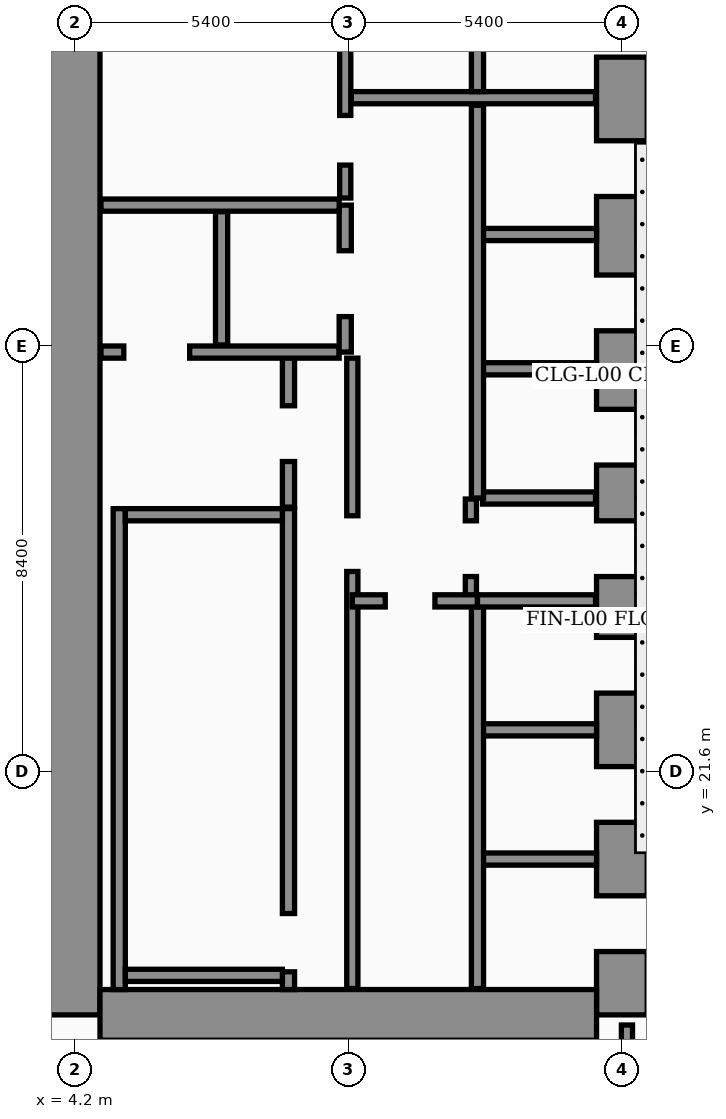
"""IFC4 building model, lengths in metres.
Left out: names, types, materials, properties, quantities, classifications, styles, units other than length and angle.
Written with IfcOpenShell. Run it as: python <this file> out.ifc"""

import sys

from ifc_helpers import new_model, si_unit, direction, frame, frame_2d, origin, place, context, subcontext, project, spatial, rectangle, extrude, element, fill, save


model = new_model("IFC4")
c1 = context("Model", 3, precision=1e-05, world=origin(), true_north=direction((0.0, 1.0)))
c2 = subcontext(c1, "Body", "Model", "MODEL_VIEW")
j1 = project(units=[si_unit("LENGTHUNIT", "METRE"), si_unit("PLANEANGLEUNIT", "RADIAN")], contexts=[c1])
p1 = place(None, origin())
s1 = spatial("IfcSite", under=j1, at=p1, CompositionType="ELEMENT")
p2 = place(p1, origin())
s2 = spatial("IfcBuilding", under=s1, at=p2, CompositionType="ELEMENT")
p3 = place(p2, origin())
s3 = spatial("IfcBuildingStorey", under=s2, at=p3, CompositionType="ELEMENT", Elevation=0.0)
p4 = place(p3, frame((4.2, 16.8, 0.0), z_axis=(0.0, 0.0, 1.0), x_axis=(0.0, 1.0, 0.0)))
e1 = element("IfcWall", 1, at=p4, inside=s3, PredefinedType="SHEAR", context=c2, shape_type="SweptSolid", body=[
    extrude(rectangle(XDim=21.6, YDim=1.0, at=frame_2d((10.8, 0.0))), origin(), (0.0, 0.0, 1.0), 5.68),
])
p5 = place(p3, frame((15.0, 16.8, 0.0), z_axis=(0.0, 0.0, 1.0), x_axis=(0.0, 1.0, 0.0)))
e2 = element("IfcWall", 2, at=p5, inside=s3, PredefinedType="SHEAR", context=c2, shape_type="SweptSolid", body=[
    extrude(rectangle(XDim=21.6, YDim=1.0, at=frame_2d((10.8, 0.0))), origin(), (0.0, 0.0, 1.0), 5.68),
])
p6 = place(p5, frame((8.65, 0.0, 0.0)))
e3 = element("IfcOpeningElement", 3, at=p6, cuts=e2, PredefinedType="OPENING", context=c2, shape_type="SweptSolid", body=[
    extrude(rectangle(XDim=1.1, YDim=2.2, at=frame_2d((0.55, 1.1))), frame((0.0, 0.51, 0.0), z_axis=(0.0, -1.0, 0.0), x_axis=(1.0, 0.0, 0.0)), (0.0, 0.0, 1.0), 1.02),
])
p7 = place(p5, frame((1.25, 0.0, 0.0)))
e4 = element("IfcOpeningElement", 4, at=p7, cuts=e2, PredefinedType="OPENING", context=c2, shape_type="SweptSolid", body=[
    extrude(rectangle(XDim=1.1, YDim=2.2, at=frame_2d((0.55, 1.1))), frame((0.0, 0.51, 0.0), z_axis=(0.0, -1.0, 0.0), x_axis=(1.0, 0.0, 0.0)), (0.0, 0.0, 1.0), 1.02),
])
p8 = place(p5, frame((3.8, 0.0, 0.0)))
e5 = element("IfcOpeningElement", 5, at=p8, cuts=e2, PredefinedType="OPENING", context=c2, shape_type="SweptSolid", body=[
    extrude(rectangle(XDim=1.1, YDim=2.2, at=frame_2d((0.55, 1.1))), frame((0.0, 0.51, 0.0), z_axis=(0.0, -1.0, 0.0), x_axis=(1.0, 0.0, 0.0)), (0.0, 0.0, 1.0), 1.02),
])
p9 = place(p5, frame((6.35, 0.0, 0.0)))
e6 = element("IfcOpeningElement", 6, at=p9, cuts=e2, PredefinedType="OPENING", context=c2, shape_type="SweptSolid", body=[
    extrude(rectangle(XDim=1.1, YDim=2.2, at=frame_2d((0.55, 1.1))), frame((0.0, 0.51, 0.0), z_axis=(0.0, -1.0, 0.0), x_axis=(1.0, 0.0, 0.0)), (0.0, 0.0, 1.0), 1.02),
])
p10 = place(p5, frame((10.85, 0.0, 0.0)))
e7 = element("IfcOpeningElement", 7, at=p10, cuts=e2, PredefinedType="OPENING", context=c2, shape_type="SweptSolid", body=[
    extrude(rectangle(XDim=1.1, YDim=2.2, at=frame_2d((0.55, 1.1))), frame((0.0, 0.51, 0.0), z_axis=(0.0, -1.0, 0.0), x_axis=(1.0, 0.0, 0.0)), (0.0, 0.0, 1.0), 1.02),
])
p11 = place(p5, frame((13.5, 0.0, 0.0)))
e8 = element("IfcOpeningElement", 8, at=p11, cuts=e2, PredefinedType="OPENING", context=c2, shape_type="SweptSolid", body=[
    extrude(rectangle(XDim=1.1, YDim=2.2, at=frame_2d((0.55, 1.1))), frame((0.0, 0.51, 0.0), z_axis=(0.0, -1.0, 0.0), x_axis=(1.0, 0.0, 0.0)), (0.0, 0.0, 1.0), 1.02),
])
p12 = place(p5, frame((16.15, 0.0, 0.0)))
e9 = element("IfcOpeningElement", 9, at=p12, cuts=e2, PredefinedType="OPENING", context=c2, shape_type="SweptSolid", body=[
    extrude(rectangle(XDim=1.1, YDim=2.2, at=frame_2d((0.55, 1.1))), frame((0.0, 0.51, 0.0), z_axis=(0.0, -1.0, 0.0), x_axis=(1.0, 0.0, 0.0)), (0.0, 0.0, 1.0), 1.02),
])
p13 = place(p5, frame((18.9, 0.0, 0.0)))
e10 = element("IfcOpeningElement", 10, at=p13, cuts=e2, PredefinedType="OPENING", context=c2, shape_type="SweptSolid", body=[
    extrude(rectangle(XDim=1.1, YDim=2.2, at=frame_2d((0.55, 1.1))), frame((0.0, 0.51, 0.0), z_axis=(0.0, -1.0, 0.0), x_axis=(1.0, 0.0, 0.0)), (0.0, 0.0, 1.0), 1.02),
])
p14 = place(p3, frame((4.7, 16.8, 0.0), z_axis=(0.0, 0.0, 1.0), x_axis=(1.0, 0.0, 0.0)))
e11 = element("IfcWall", 11, at=p14, inside=s3, PredefinedType="SHEAR", context=c2, shape_type="SweptSolid", body=[
    extrude(rectangle(XDim=9.8, YDim=1.0, at=frame_2d((4.9, 0.0))), origin(), (0.0, 0.0, 1.0), 5.68),
])
p15 = place(p3, frame((5.08, 17.3, 0.0), z_axis=(0.0, 0.0, 1.0), x_axis=(0.0, 1.0, 0.0)))
e12 = element("IfcWall", 12, at=p15, inside=s3, PredefinedType="SOLIDWALL", context=c2, shape_type="SweptSolid", body=[
    extrude(rectangle(XDim=9.49, YDim=0.24, at=frame_2d((4.745, 0.0))), origin(), (0.0, 0.0, 1.0), 5.68),
])
p16 = place(p3, frame((8.42, 17.3, 0.0), z_axis=(0.0, 0.0, 1.0), x_axis=(0.0, 1.0, 0.0)))
e13 = element("IfcWall", 13, at=p16, inside=s3, PredefinedType="SOLIDWALL", context=c2, shape_type="SweptSolid", body=[
    extrude(rectangle(XDim=9.49, YDim=0.24, at=frame_2d((4.745, 0.0))), origin(), (0.0, 0.0, 1.0), 5.68),
])
p17 = place(p16, frame((0.35, 0.0, 0.0)))
e14 = element("IfcOpeningElement", 14, at=p17, cuts=e13, PredefinedType="OPENING", context=c2, shape_type="SweptSolid", body=[
    extrude(rectangle(XDim=1.15, YDim=2.2, at=frame_2d((0.575, 1.1))), frame((0.0, 0.13, 0.0), z_axis=(0.0, -1.0, 0.0), x_axis=(1.0, 0.0, 0.0)), (0.0, 0.0, 1.0), 0.26),
])
for number, where, z_axis, x_axis in (
    (15, (5.2, 17.58, 0.0), (0.0, 0.0, 1.0), (1.0, 0.0, 0.0)),
    (16, (5.2, 26.67, 0.0), (0.0, 0.0, 1.0), (1.0, 0.0, 0.0)),
):
    element("IfcWall", number, at=place(p3, frame(where, z_axis=z_axis, x_axis=x_axis)), inside=s3, PredefinedType="SOLIDWALL", context=c2, shape_type="SweptSolid", body=[
        extrude(rectangle(XDim=3.1, YDim=0.24, at=frame_2d((1.55, 0.0))), origin(), (0.0, 0.0, 1.0), 5.68),
    ])
for number, where, z_axis, x_axis in (
    (17, (12.18, 19.875, 0.0), (0.0, 0.0, 1.0), (1.0, 0.0, 0.0)),
    (18, (12.18, 22.425, 0.0), (0.0, 0.0, 1.0), (1.0, 0.0, 0.0)),
    (19, (12.18, 29.55, 0.0), (0.0, 0.0, 1.0), (1.0, 0.0, 0.0)),
    (20, (12.18, 32.2, 0.0), (0.0, 0.0, 1.0), (1.0, 0.0, 0.0)),
):
    element("IfcWall", number, at=place(p3, frame(where, z_axis=z_axis, x_axis=x_axis)), inside=s3, PredefinedType="SOLIDWALL", context=c2, shape_type="SweptSolid", body=[
        extrude(rectangle(XDim=2.32, YDim=0.24, at=frame_2d((1.16, 0.0))), origin(), (0.0, 0.0, 1.0), 5.68),
    ])
p18 = place(p3, frame((8.42, 26.82, 0.0), z_axis=(0.0, 0.0, 1.0), x_axis=(0.0, 1.0, 0.0)))
e21 = element("IfcWall", 21, at=p18, inside=s3, PredefinedType="SOLIDWALL", context=c2, shape_type="SweptSolid", body=[
    extrude(rectangle(XDim=3.0, YDim=0.24, at=frame_2d((1.5, 0.0))), origin(), (0.0, 0.0, 1.0), 5.68),
])
p19 = place(p18, frame((0.9, 0.0, 0.0)))
e22 = element("IfcOpeningElement", 22, at=p19, cuts=e21, PredefinedType="OPENING", context=c2, shape_type="SweptSolid", body=[
    extrude(rectangle(XDim=1.1, YDim=2.2, at=frame_2d((0.55, 1.1))), frame((0.0, 0.13, 0.0), z_axis=(0.0, -1.0, 0.0), x_axis=(1.0, 0.0, 0.0)), (0.0, 0.0, 1.0), 0.26),
])
p20 = place(p3, frame((4.72, 29.88, 0.0), z_axis=(0.0, 0.0, 1.0), x_axis=(1.0, 0.0, 0.0)))
e23 = element("IfcWall", 23, at=p20, inside=s3, PredefinedType="SOLIDWALL", context=c2, shape_type="SweptSolid", body=[
    extrude(rectangle(XDim=4.7, YDim=0.24, at=frame_2d((2.35, 0.0))), origin(), (0.0, 0.0, 1.0), 5.68),
])
p21 = place(p20, frame((0.45, 0.0, 0.0)))
e24 = element("IfcOpeningElement", 24, at=p21, cuts=e23, PredefinedType="OPENING", context=c2, shape_type="SweptSolid", body=[
    extrude(rectangle(XDim=1.3, YDim=2.35, at=frame_2d((0.65, 1.175))), frame((0.0, 0.13, 0.0), z_axis=(0.0, -1.0, 0.0), x_axis=(1.0, 0.0, 0.0)), (0.0, 0.0, 1.0), 0.26),
])
p22 = place(p3, frame((7.1, 30.02, 0.0), z_axis=(0.0, 0.0, 1.0), x_axis=(0.0, 1.0, 0.0)))
e25 = element("IfcWall", 25, at=p22, inside=s3, PredefinedType="SOLIDWALL", context=c2, shape_type="SweptSolid", body=[
    extrude(rectangle(XDim=2.63, YDim=0.24, at=frame_2d((1.315, 0.0))), origin(), (0.0, 0.0, 1.0), 5.68),
])
p23 = place(p3, frame((9.54, 29.88, 0.0), z_axis=(0.0, 0.0, 1.0), x_axis=(0.0, 1.0, 0.0)))
e26 = element("IfcWall", 26, at=p23, inside=s3, PredefinedType="SOLIDWALL", context=c2, shape_type="SweptSolid", body=[
    extrude(rectangle(XDim=2.9, YDim=0.24, at=frame_2d((1.45, 0.0))), origin(), (0.0, 0.0, 1.0), 5.68),
])
p24 = place(p23, frame((0.7, 0.0, 0.0)))
e27 = element("IfcOpeningElement", 27, at=p24, cuts=e26, PredefinedType="OPENING", context=c2, shape_type="SweptSolid", body=[
    extrude(rectangle(XDim=1.3, YDim=2.35, at=frame_2d((0.65, 1.175))), frame((0.0, 0.13, 0.0), z_axis=(0.0, -1.0, 0.0), x_axis=(1.0, 0.0, 0.0)), (0.0, 0.0, 1.0), 0.26),
])
p25 = place(p3, frame((4.72, 32.78, 0.0), z_axis=(0.0, 0.0, 1.0), x_axis=(1.0, 0.0, 0.0)))
e28 = element("IfcWall", 28, at=p25, inside=s3, PredefinedType="SOLIDWALL", context=c2, shape_type="SweptSolid", body=[
    extrude(rectangle(XDim=4.7, YDim=0.24, at=frame_2d((2.35, 0.0))), origin(), (0.0, 0.0, 1.0), 5.68),
])
p26 = place(p3, frame((9.68, 17.32, 0.0), z_axis=(0.0, 0.0, 1.0), x_axis=(0.0, 1.0, 0.0)))
e29 = element("IfcWall", 29, at=p26, inside=s3, PredefinedType="SOLIDWALL", context=c2, shape_type="SweptSolid", body=[
    extrude(rectangle(XDim=12.44, YDim=0.22, at=frame_2d((6.22, 0.0))), origin(), (0.0, 0.0, 1.0), 5.68),
])
p27 = place(p26, frame((8.23, 0.0, 0.0)))
e30 = element("IfcOpeningElement", 30, at=p27, cuts=e29, PredefinedType="OPENING", context=c2, shape_type="SweptSolid", body=[
    extrude(rectangle(XDim=1.1, YDim=2.2, at=frame_2d((0.55, 1.1))), frame((0.0, 0.12, 0.0), z_axis=(0.0, -1.0, 0.0), x_axis=(1.0, 0.0, 0.0)), (0.0, 0.0, 1.0), 0.24),
])
p28 = place(p3, frame((12.02, 25.05, 0.0), z_axis=(0.0, 0.0, 1.0), x_axis=(0.0, 1.0, 0.0)))
e31 = element("IfcWall", 31, at=p28, inside=s3, PredefinedType="SOLIDWALL", context=c2, shape_type="SweptSolid", body=[
    extrude(rectangle(XDim=1.93, YDim=0.22, at=frame_2d((0.965, 0.0))), origin(), (0.0, 0.0, 1.0), 5.68),
])
p29 = place(p28, frame((0.4, 0.0, 0.0)))
e32 = element("IfcOpeningElement", 32, at=p29, cuts=e31, PredefinedType="OPENING", context=c2, shape_type="SweptSolid", body=[
    extrude(rectangle(XDim=1.1, YDim=2.2, at=frame_2d((0.55, 1.1))), frame((0.0, 0.12, 0.0), z_axis=(0.0, -1.0, 0.0), x_axis=(1.0, 0.0, 0.0)), (0.0, 0.0, 1.0), 0.24),
])
p30 = place(p3, frame((9.54, 32.92, 0.0), z_axis=(0.0, 0.0, 1.0), x_axis=(0.0, 1.0, 0.0)))
e33 = element("IfcWall", 33, at=p30, inside=s3, PredefinedType="SOLIDWALL", context=c2, shape_type="SweptSolid", body=[
    extrude(rectangle(XDim=4.96, YDim=0.22, at=frame_2d((2.48, 0.0))), origin(), (0.0, 0.0, 1.0), 5.68),
])
p31 = place(p30, frame((0.65, 0.0, 0.0)))
e34 = element("IfcOpeningElement", 34, at=p31, cuts=e33, PredefinedType="OPENING", context=c2, shape_type="SweptSolid", body=[
    extrude(rectangle(XDim=0.98, YDim=2.15, at=frame_2d((0.49, 1.075))), frame((0.0, 0.12, 0.0), z_axis=(0.0, -1.0, 0.0), x_axis=(1.0, 0.0, 0.0)), (0.0, 0.0, 1.0), 0.24),
])
p32 = place(p3, frame((12.15, 17.32, 0.0), z_axis=(0.0, 0.0, 1.0), x_axis=(0.0, 1.0, 0.0)))
e35 = element("IfcWall", 35, at=p32, inside=s3, PredefinedType="SOLIDWALL", context=c2, shape_type="SweptSolid", body=[
    extrude(rectangle(XDim=7.65, YDim=0.24, at=frame_2d((3.825, 0.0))), origin(), (0.0, 0.0, 1.0), 5.68),
])
p33 = place(p3, frame((9.68, 24.97, 0.0), z_axis=(0.0, 0.0, 1.0), x_axis=(1.0, 0.0, 0.0)))
e36 = element("IfcWall", 36, at=p33, inside=s3, PredefinedType="SOLIDWALL", context=c2, shape_type="SweptSolid", body=[
    extrude(rectangle(XDim=2.47, YDim=0.24, at=frame_2d((1.235, 0.0))), origin(), (0.0, 0.0, 1.0), 5.68),
])
p34 = place(p33, frame((0.65, 0.0, 0.0)))
e37 = element("IfcOpeningElement", 37, at=p34, cuts=e36, PredefinedType="OPENING", context=c2, shape_type="SweptSolid", body=[
    extrude(rectangle(XDim=0.98, YDim=2.15, at=frame_2d((0.49, 1.075))), frame((0.0, 0.13, 0.0), z_axis=(0.0, -1.0, 0.0), x_axis=(1.0, 0.0, 0.0)), (0.0, 0.0, 1.0), 0.26),
])
p35 = place(p3, frame((12.15, 24.97, 0.0), z_axis=(0.0, 0.0, 1.0), x_axis=(1.0, 0.0, 0.0)))
e38 = element("IfcWall", 38, at=p35, inside=s3, PredefinedType="SOLIDWALL", context=c2, shape_type="SweptSolid", body=[
    extrude(rectangle(XDim=2.33, YDim=0.24, at=frame_2d((1.165, 0.0))), origin(), (0.0, 0.0, 1.0), 4.88),
])
p36 = place(p3, frame((12.25, 27.0, 0.0), z_axis=(0.0, 0.0, 1.0), x_axis=(1.0, 0.0, 0.0)))
e39 = element("IfcWall", 39, at=p36, inside=s3, PredefinedType="SOLIDWALL", context=c2, shape_type="SweptSolid", body=[
    extrude(rectangle(XDim=2.23, YDim=0.24, at=frame_2d((1.115, 0.0))), origin(), (0.0, 0.0, 1.0), 5.68),
])
p37 = place(p3, frame((12.15, 27.0, 0.0), z_axis=(0.0, 0.0, 1.0), x_axis=(0.0, 1.0, 0.0)))
e40 = element("IfcWall", 40, at=p37, inside=s3, PredefinedType="SOLIDWALL", context=c2, shape_type="SweptSolid", body=[
    extrude(rectangle(XDim=7.75, YDim=0.24, at=frame_2d((3.875, 0.0))), origin(), (0.0, 0.0, 1.0), 5.68),
])
p38 = place(p3, frame((9.66, 34.9, 0.0), z_axis=(0.0, 0.0, 1.0), x_axis=(1.0, 0.0, 0.0)))
e41 = element("IfcWall", 41, at=p38, inside=s3, PredefinedType="SOLIDWALL", context=c2, shape_type="SweptSolid", body=[
    extrude(rectangle(XDim=4.82, YDim=0.24, at=frame_2d((2.41, 0.0))), origin(), (0.0, 0.0, 1.0), 5.68),
])
p39 = place(p3, frame((12.15, 35.02, 0.0), z_axis=(0.0, 0.0, 1.0), x_axis=(0.0, 1.0, 0.0)))
e42 = element("IfcWall", 42, at=p39, inside=s3, PredefinedType="SOLIDWALL", context=c2, shape_type="SweptSolid", body=[
    extrude(rectangle(XDim=2.86, YDim=0.24, at=frame_2d((1.43, 0.0))), origin(), (0.0, 0.0, 1.0), 5.68),
])
p40 = place(p3, frame((15.1, 12.3, 0.0), z_axis=(0.0, 0.0, 1.0), x_axis=(0.0, 1.0, 0.0)))
e43 = element("IfcWall", 43, at=p40, inside=s3, PredefinedType="SOLIDWALL", context=c2, shape_type="SweptSolid", body=[
    extrude(rectangle(XDim=4.3, YDim=0.22, at=frame_2d((2.15, 0.0))), origin(), (0.0, 0.0, 1.0), 4.48),
])
p41 = place(p40, frame((1.35, 0.0, 0.0)))
e44 = element("IfcOpeningElement", 44, at=p41, cuts=e43, PredefinedType="OPENING", context=c2, shape_type="SweptSolid", body=[
    extrude(rectangle(XDim=1.1, YDim=2.2, at=frame_2d((0.55, 1.1))), frame((0.0, 0.12, 0.0), z_axis=(0.0, -1.0, 0.0), x_axis=(1.0, 0.0, 0.0)), (0.0, 0.0, 1.0), 0.24),
])
p42 = place(p19, origin())
e45 = element("IfcDoor", 45, at=p42, inside=s3, OperationType="SINGLE_SWING_RIGHT", PredefinedType="DOOR", context=c2, shape_type="SweptSolid", body=[
    extrude(rectangle(XDim=1.1, YDim=2.2, at=frame_2d((0.55, 1.1))), frame((0.0, 0.025, 0.0), z_axis=(0.0, -1.0, 0.0), x_axis=(1.0, 0.0, 0.0)), (0.0, 0.0, 1.0), 0.05),
])
fill(e22, e45)
p43 = place(p21, origin())
e46 = element("IfcDoor", 46, at=p43, inside=s3, OperationType="DOUBLE_DOOR_SLIDING", PredefinedType="DOOR", context=c2, shape_type="SweptSolid", body=[
    extrude(rectangle(XDim=1.3, YDim=2.35, at=frame_2d((0.65, 1.175))), frame((0.0, 0.025, 0.0), z_axis=(0.0, -1.0, 0.0), x_axis=(1.0, 0.0, 0.0)), (0.0, 0.0, 1.0), 0.05),
])
fill(e24, e46)
p44 = place(p24, origin())
e47 = element("IfcDoor", 47, at=p44, inside=s3, OperationType="DOUBLE_DOOR_SLIDING", PredefinedType="DOOR", context=c2, shape_type="SweptSolid", body=[
    extrude(rectangle(XDim=1.3, YDim=2.35, at=frame_2d((0.65, 1.175))), frame((0.0, 0.025, 0.0), z_axis=(0.0, -1.0, 0.0), x_axis=(1.0, 0.0, 0.0)), (0.0, 0.0, 1.0), 0.05),
])
fill(e27, e47)
p45 = place(p27, origin())
e48 = element("IfcDoor", 48, at=p45, inside=s3, OperationType="SINGLE_SWING_RIGHT", PredefinedType="DOOR", context=c2, shape_type="SweptSolid", body=[
    extrude(rectangle(XDim=1.1, YDim=2.2, at=frame_2d((0.55, 1.1))), frame((0.0, 0.025, 0.0), z_axis=(0.0, -1.0, 0.0), x_axis=(1.0, 0.0, 0.0)), (0.0, 0.0, 1.0), 0.05),
])
fill(e30, e48)
p46 = place(p29, origin())
e49 = element("IfcDoor", 49, at=p46, inside=s3, OperationType="SINGLE_SWING_RIGHT", PredefinedType="DOOR", context=c2, shape_type="SweptSolid", body=[
    extrude(rectangle(XDim=1.1, YDim=2.2, at=frame_2d((0.55, 1.1))), frame((0.0, 0.025, 0.0), z_axis=(0.0, -1.0, 0.0), x_axis=(1.0, 0.0, 0.0)), (0.0, 0.0, 1.0), 0.05),
])
fill(e32, e49)
p47 = place(p31, origin())
e50 = element("IfcDoor", 50, at=p47, inside=s3, OperationType="SINGLE_SWING_LEFT", PredefinedType="DOOR", context=c2, shape_type="SweptSolid", body=[
    extrude(rectangle(XDim=0.98, YDim=2.15, at=frame_2d((0.49, 1.075))), frame((0.0, 0.025, 0.0), z_axis=(0.0, -1.0, 0.0), x_axis=(1.0, 0.0, 0.0)), (0.0, 0.0, 1.0), 0.05),
])
fill(e34, e50)
p48 = place(p34, origin())
e51 = element("IfcDoor", 51, at=p48, inside=s3, OperationType="SINGLE_SWING_LEFT", PredefinedType="DOOR", context=c2, shape_type="SweptSolid", body=[
    extrude(rectangle(XDim=0.98, YDim=2.15, at=frame_2d((0.49, 1.075))), frame((0.0, 0.025, 0.0), z_axis=(0.0, -1.0, 0.0), x_axis=(1.0, 0.0, 0.0)), (0.0, 0.0, 1.0), 0.05),
])
fill(e37, e51)
p49 = place(p17, origin())
e52 = element("IfcDoor", 52, at=p49, inside=s3, OperationType="SINGLE_SWING_LEFT", PredefinedType="DOOR", context=c2, shape_type="SweptSolid", body=[
    extrude(rectangle(XDim=1.15, YDim=2.2, at=frame_2d((0.575, 1.1))), frame((0.0, 0.025, 0.0), z_axis=(0.0, -1.0, 0.0), x_axis=(1.0, 0.0, 0.0)), (0.0, 0.0, 1.0), 0.05),
])
fill(e14, e52)
p50 = place(p6, origin())
e53 = element("IfcDoor", 53, at=p50, inside=s3, OperationType="SINGLE_SWING_LEFT", PredefinedType="DOOR", context=c2, shape_type="SweptSolid", body=[
    extrude(rectangle(XDim=1.1, YDim=2.2, at=frame_2d((0.55, 1.1))), frame((0.0, 0.025, 0.0), z_axis=(0.0, -1.0, 0.0), x_axis=(1.0, 0.0, 0.0)), (0.0, 0.0, 1.0), 0.05),
])
fill(e3, e53)
p51 = place(p7, origin())
e54 = element("IfcDoor", 54, at=p51, inside=s3, OperationType="DOUBLE_DOOR_SLIDING", PredefinedType="DOOR", context=c2, shape_type="SweptSolid", body=[
    extrude(rectangle(XDim=1.1, YDim=2.2, at=frame_2d((0.55, 1.1))), frame((0.0, 0.025, 0.0), z_axis=(0.0, -1.0, 0.0), x_axis=(1.0, 0.0, 0.0)), (0.0, 0.0, 1.0), 0.05),
])
fill(e4, e54)
p52 = place(p8, origin())
e55 = element("IfcDoor", 55, at=p52, inside=s3, OperationType="DOUBLE_DOOR_SLIDING", PredefinedType="DOOR", context=c2, shape_type="SweptSolid", body=[
    extrude(rectangle(XDim=1.1, YDim=2.2, at=frame_2d((0.55, 1.1))), frame((0.0, 0.025, 0.0), z_axis=(0.0, -1.0, 0.0), x_axis=(1.0, 0.0, 0.0)), (0.0, 0.0, 1.0), 0.05),
])
fill(e5, e55)
p53 = place(p9, origin())
e56 = element("IfcDoor", 56, at=p53, inside=s3, OperationType="DOUBLE_DOOR_SLIDING", PredefinedType="DOOR", context=c2, shape_type="SweptSolid", body=[
    extrude(rectangle(XDim=1.1, YDim=2.2, at=frame_2d((0.55, 1.1))), frame((0.0, 0.025, 0.0), z_axis=(0.0, -1.0, 0.0), x_axis=(1.0, 0.0, 0.0)), (0.0, 0.0, 1.0), 0.05),
])
fill(e6, e56)
p54 = place(p10, origin())
e57 = element("IfcDoor", 57, at=p54, inside=s3, OperationType="DOUBLE_DOOR_SLIDING", PredefinedType="DOOR", context=c2, shape_type="SweptSolid", body=[
    extrude(rectangle(XDim=1.1, YDim=2.2, at=frame_2d((0.55, 1.1))), frame((0.0, 0.025, 0.0), z_axis=(0.0, -1.0, 0.0), x_axis=(1.0, 0.0, 0.0)), (0.0, 0.0, 1.0), 0.05),
])
fill(e7, e57)
p55 = place(p11, origin())
e58 = element("IfcDoor", 58, at=p55, inside=s3, OperationType="DOUBLE_DOOR_SLIDING", PredefinedType="DOOR", context=c2, shape_type="SweptSolid", body=[
    extrude(rectangle(XDim=1.1, YDim=2.2, at=frame_2d((0.55, 1.1))), frame((0.0, 0.025, 0.0), z_axis=(0.0, -1.0, 0.0), x_axis=(1.0, 0.0, 0.0)), (0.0, 0.0, 1.0), 0.05),
])
fill(e8, e58)
p56 = place(p12, origin())
e59 = element("IfcDoor", 59, at=p56, inside=s3, OperationType="DOUBLE_DOOR_SLIDING", PredefinedType="DOOR", context=c2, shape_type="SweptSolid", body=[
    extrude(rectangle(XDim=1.1, YDim=2.2, at=frame_2d((0.55, 1.1))), frame((0.0, 0.025, 0.0), z_axis=(0.0, -1.0, 0.0), x_axis=(1.0, 0.0, 0.0)), (0.0, 0.0, 1.0), 0.05),
])
fill(e9, e59)
p57 = place(p13, origin())
e60 = element("IfcDoor", 60, at=p57, inside=s3, OperationType="DOUBLE_DOOR_SLIDING", PredefinedType="DOOR", context=c2, shape_type="SweptSolid", body=[
    extrude(rectangle(XDim=1.1, YDim=2.2, at=frame_2d((0.55, 1.1))), frame((0.0, 0.025, 0.0), z_axis=(0.0, -1.0, 0.0), x_axis=(1.0, 0.0, 0.0)), (0.0, 0.0, 1.0), 0.05),
])
fill(e10, e60)
save(model, sys.argv[1])
